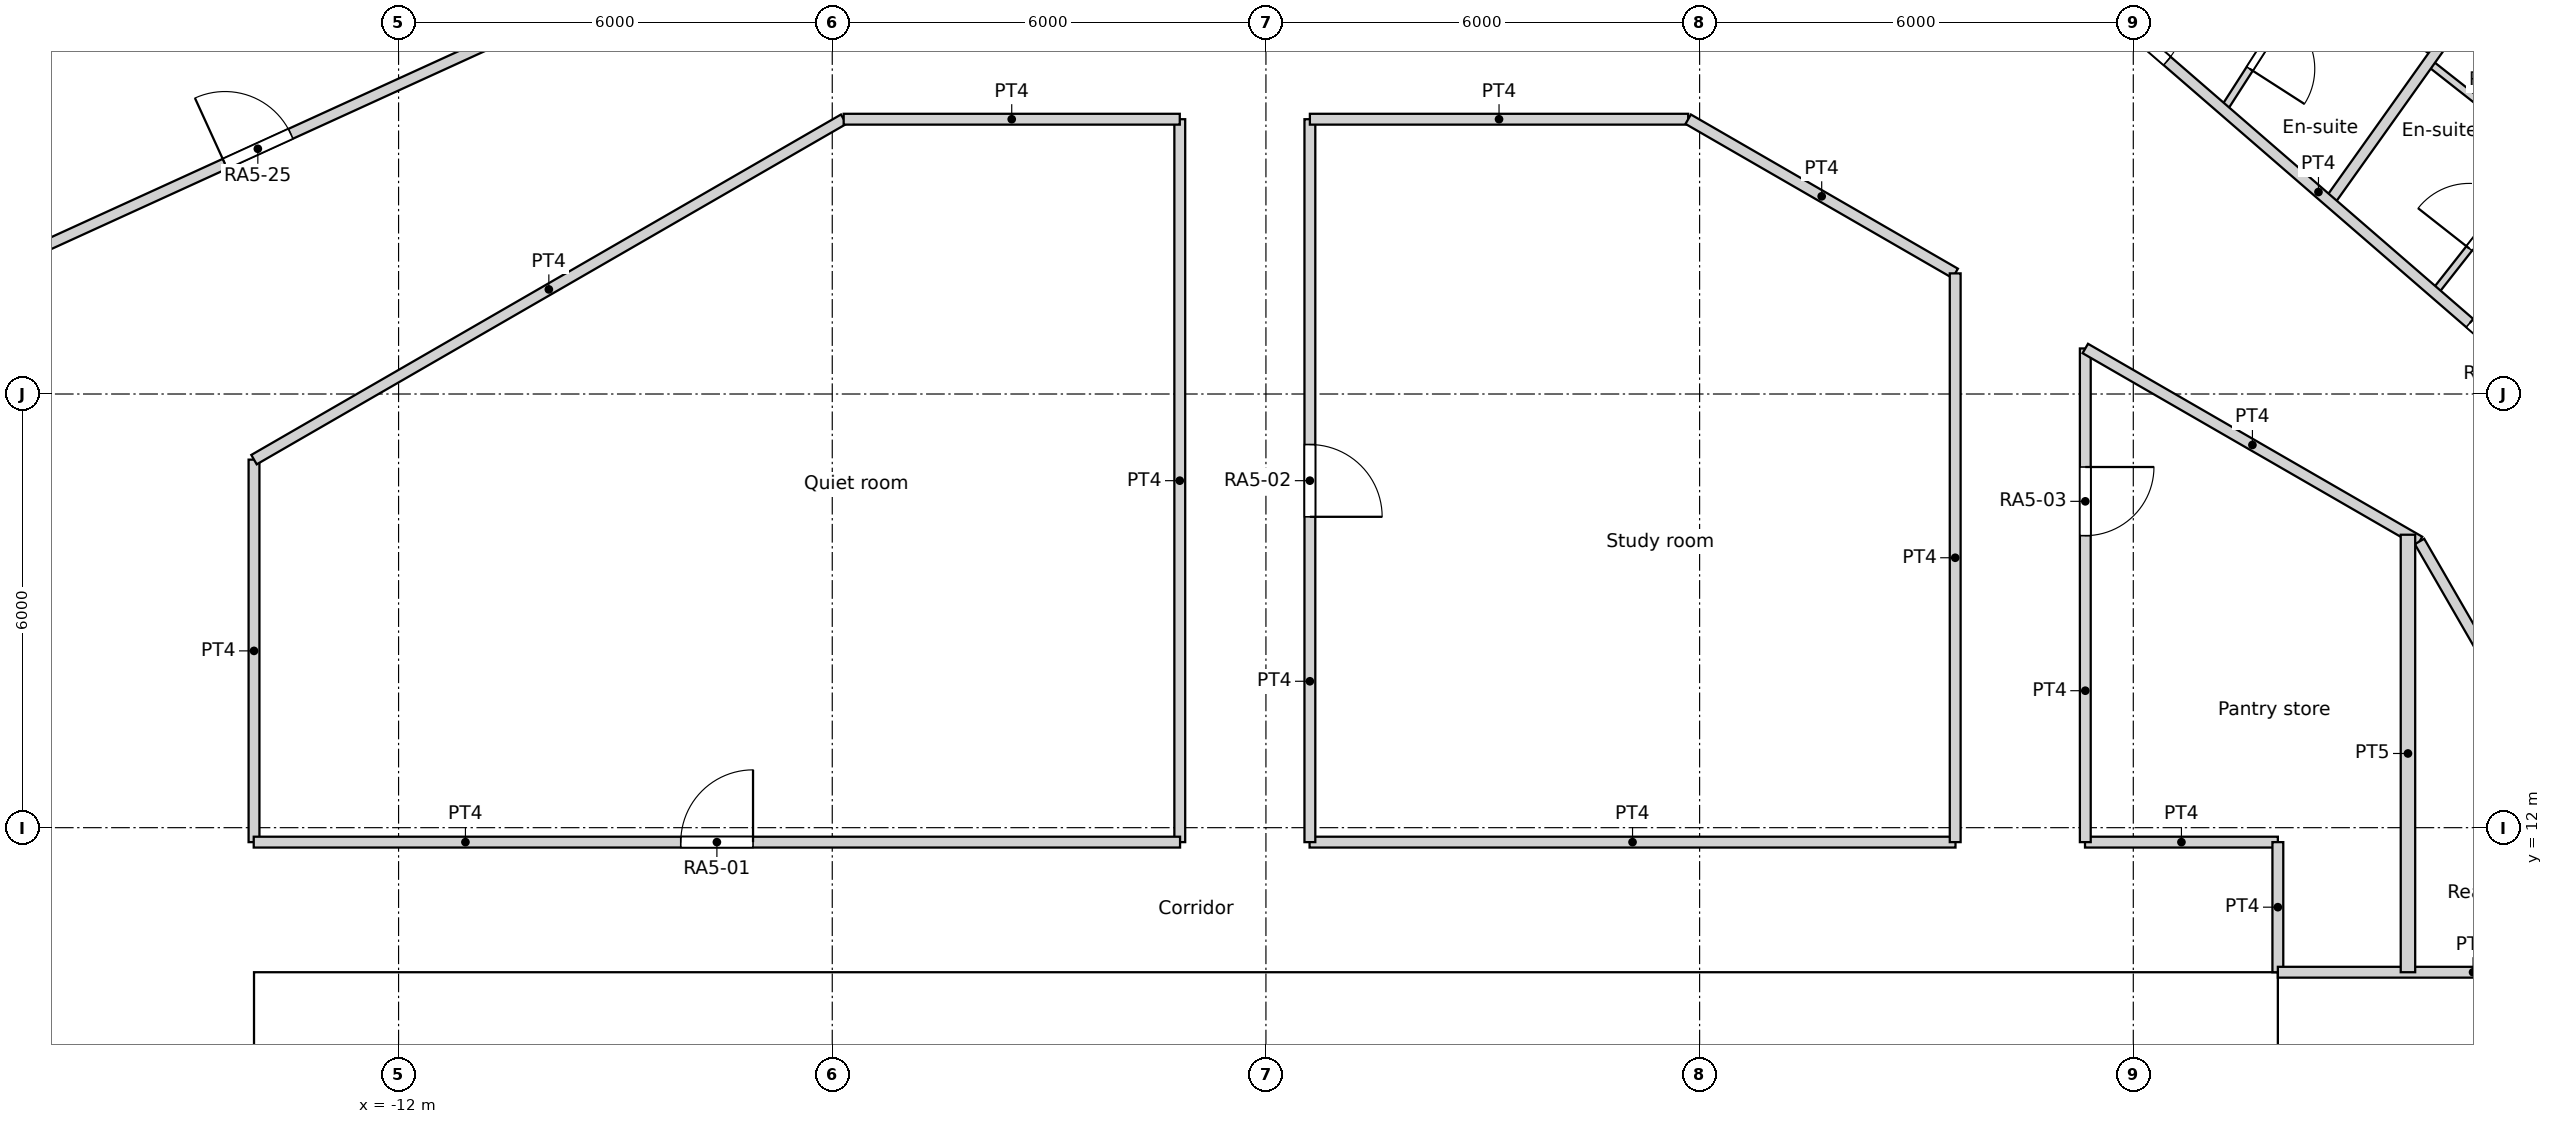
"""IFC4 building model, lengths in metres.
Left out: names, types, materials, properties, quantities, classifications, styles, units other than length and angle.
Written with IfcOpenShell. Run it as: python <this file> out.ifc"""

import sys

from ifc_helpers import new_model, si_unit, direction, frame, frame_2d, origin, origin_2d, place, context, subcontext, project, spatial, rectangle, circle, extrude, element, fill, save


model = new_model("IFC4")
c1 = context("Model", 3, precision=1e-05, world=origin(), true_north=direction((0.0, 1.0)))
c2 = subcontext(c1, "Body", "Model", "MODEL_VIEW")
j1 = project(units=[si_unit("LENGTHUNIT", "METRE"), si_unit("PLANEANGLEUNIT", "RADIAN")], contexts=[c1])
p1 = place(None, origin())
s1 = spatial("IfcSite", under=j1, at=p1, CompositionType="ELEMENT")
p2 = place(p1, origin())
s2 = spatial("IfcBuilding", under=s1, at=p2, CompositionType="ELEMENT")
p3 = place(p2, frame((0.0, 0.0, 71.4)))
s3 = spatial("IfcBuildingStorey", under=s2, at=p3, CompositionType="ELEMENT", Elevation=71.4)
for number, where, z_axis, x_axis in (
    (1, (14.659, 19.69, 0.0), (0.0, 0.0, 1.0), (1.0, 0.0, 0.0)),
    (2, (9.723, 22.54, 0.0), (0.0, 0.0, 1.0), (1.0, 0.0, 0.0)),
    (3, (-12.274, 21.259, 0.0), (0.0, 0.0, 1.0), (1.0, 0.0, 0.0)),
    (4, (-16.846, 17.855, 0.0), (0.0, 0.0, 1.0), (1.0, 0.0, 0.0)),
):
    element("IfcColumn", number, at=place(p3, frame(where, z_axis=z_axis, x_axis=x_axis)), inside=s3, PredefinedType="COLUMN", context=c2, shape_type="SweptSolid", body=[
        extrude(circle(Radius=0.65, at=origin_2d()), origin(), (0.0, 0.0, 1.0), 3.6),
    ])
for number, where, z_axis, x_axis in (
    (5, (15.552, 10.603, 0.0), (0.0, 0.0, 1.0), (1.0, 0.0, 0.0)),
    (6, (11.735, 14.716, 0.0), (0.0, 0.0, 1.0), (1.0, 0.0, 0.0)),
    (7, (6.876, 17.521, 0.0), (0.0, 0.0, 1.0), (1.0, 0.0, 0.0)),
    (8, (1.406, 18.77, 0.0), (0.0, 0.0, 1.0), (1.0, 0.0, 0.0)),
    (9, (-4.188, 18.35, 0.0), (0.0, 0.0, 1.0), (1.0, 0.0, 0.0)),
    (10, (-9.411, 16.301, 0.0), (0.0, 0.0, 1.0), (1.0, 0.0, 0.0)),
    (11, (-13.798, 12.802, 0.0), (0.0, 0.0, 1.0), (1.0, 0.0, 0.0)),
):
    element("IfcColumn", number, at=place(p3, frame(where, z_axis=z_axis, x_axis=x_axis)), inside=s3, PredefinedType="COLUMN", context=c2, shape_type="SweptSolid", body=[
        extrude(circle(Radius=0.7, at=origin_2d()), origin(), (0.0, 0.0, 1.0), 3.6),
    ])
p4 = place(p3, frame((-14.0, 9.4, 0.0), z_axis=(0.0, 0.0, 1.0), x_axis=(1.0, 0.0, 0.0)))
e12 = element("IfcWall", 12, at=p4, inside=s3, PredefinedType="SOLIDWALL", context=c2, shape_type="SweptSolid", body=[
    extrude(rectangle(XDim=28.0, YDim=1.2, at=frame_2d((14.0, 0.0))), origin(), (0.0, 0.0, 1.0), 3.6),
])
p5 = place(p4, frame((9.8, 0.0, 0.0)))
e13 = element("IfcOpeningElement", 13, at=p5, cuts=e12, PredefinedType="OPENING", context=c2, shape_type="SweptSolid", body=[
    extrude(rectangle(XDim=1.8, YDim=2.1, at=frame_2d((0.9, 1.05))), frame((0.0, 0.6, 0.0), z_axis=(0.0, -1.0, 0.0), x_axis=(1.0, 0.0, 0.0)), (0.0, 0.0, 1.0), 1.2),
])
p6 = place(p3, frame((-14.004, 11.8, 0.0), z_axis=(0.0, 0.0, 1.0), x_axis=(1.0, 0.0, 0.0)))
e14 = element("IfcWall", 14, at=p6, inside=s3, PredefinedType="PARTITIONING", context=c2, shape_type="SweptSolid", body=[
    extrude(rectangle(XDim=12.816, YDim=0.15, at=frame_2d((6.408, 0.0))), origin(), (0.0, 0.0, 1.0), 3.15),
])
p7 = place(p6, frame((5.908, 0.0, 0.0)))
e15 = element("IfcOpeningElement", 15, at=p7, cuts=e14, PredefinedType="OPENING", context=c2, shape_type="SweptSolid", body=[
    extrude(rectangle(XDim=1.0, YDim=2.04, at=frame_2d((0.5, 1.02))), frame((0.0, 0.075, 0.0), z_axis=(0.0, -1.0, 0.0), x_axis=(1.0, 0.0, 0.0)), (0.0, 0.0, 1.0), 0.15),
])
p8 = place(p3, frame((0.604, 11.8, 0.0), z_axis=(0.0, 0.0, 1.0), x_axis=(1.0, 0.0, 0.0)))
e16 = element("IfcWall", 16, at=p8, inside=s3, PredefinedType="PARTITIONING", context=c2, shape_type="SweptSolid", body=[
    extrude(rectangle(XDim=8.936, YDim=0.15, at=frame_2d((4.468, 0.0))), origin(), (0.0, 0.0, 1.0), 3.15),
])
p9 = place(p3, frame((11.332, 11.8, 0.0), z_axis=(0.0, 0.0, 1.0), x_axis=(1.0, 0.0, 0.0)))
e17 = element("IfcWall", 17, at=p9, inside=s3, PredefinedType="PARTITIONING", context=c2, shape_type="SweptSolid", body=[
    extrude(rectangle(XDim=2.668, YDim=0.15, at=frame_2d((1.334, 0.0))), origin(), (0.0, 0.0, 1.0), 3.15),
])
p10 = place(p3, frame((14.0, 10.0, 0.0), z_axis=(0.0, 0.0, 1.0), x_axis=(0.0, 1.0, 0.0)))
e18 = element("IfcWall", 18, at=p10, inside=s3, PredefinedType="PARTITIONING", context=c2, shape_type="SweptSolid", body=[
    extrude(rectangle(XDim=1.8, YDim=0.15, at=frame_2d((0.9, 0.0))), origin(), (0.0, 0.0, 1.0), 3.15),
])
p11 = place(p3, frame((14.0, 10.0, 0.0), z_axis=(0.0, 0.0, 1.0), x_axis=(1.0, 0.0, 0.0)))
e19 = element("IfcWall", 19, at=p11, inside=s3, PredefinedType="PARTITIONING", context=c2, shape_type="SweptSolid", body=[
    extrude(rectangle(XDim=5.401, YDim=0.15, at=frame_2d((2.7, 0.0))), origin(), (0.0, 0.0, 1.0), 3.15),
])
p12 = place(p3, frame((15.96, 15.96, 0.0), z_axis=(0.0, 0.0, 1.0), x_axis=(0.499992689227, -0.86602962462, 0.0)))
e20 = element("IfcWall", 20, at=p12, inside=s3, PredefinedType="PARTITIONING", context=c2, shape_type="SweptSolid", body=[
    extrude(rectangle(XDim=6.882, YDim=0.15, at=frame_2d((3.441, 0.0))), origin(), (0.0, 0.0, 1.0), 3.15),
])
p13 = place(p12, frame((2.941, 0.0, 0.0)))
e21 = element("IfcOpeningElement", 21, at=p13, cuts=e20, PredefinedType="OPENING", context=c2, shape_type="SweptSolid", body=[
    extrude(rectangle(XDim=1.0, YDim=2.04, at=frame_2d((0.5, 1.02))), frame((0.0, 0.075, 0.0), z_axis=(0.0, -1.0, 0.0), x_axis=(1.0, 0.0, 0.0)), (0.0, 0.0, 1.0), 0.15),
])
p14 = place(p3, frame((10.932, 23.939, 0.0), z_axis=(0.0, 0.0, 1.0), x_axis=(0.755838982892, -0.654757536757, 0.0)))
e22 = element("IfcWall", 22, at=p14, inside=s3, PredefinedType="PARTITIONING", context=c2, shape_type="SweptSolid", body=[
    extrude(rectangle(XDim=14.83, YDim=0.15, at=frame_2d((7.415, 0.0))), origin(), (0.0, 0.0, 1.0), 3.15),
])
p15 = place(p14, frame((12.796, 0.0, 0.0)))
e23 = element("IfcOpeningElement", 23, at=p15, cuts=e22, PredefinedType="OPENING", context=c2, shape_type="SweptSolid", body=[
    extrude(rectangle(XDim=1.0, YDim=2.1, at=frame_2d((0.5, 1.05))), frame((0.0, 0.075, 0.0), z_axis=(0.0, -1.0, 0.0), x_axis=(1.0, 0.0, 0.0)), (0.0, 0.0, 1.0), 0.15),
])
p16 = place(p14, frame((7.572, 0.0, 0.0)))
e24 = element("IfcOpeningElement", 24, at=p16, cuts=e22, PredefinedType="OPENING", context=c2, shape_type="SweptSolid", body=[
    extrude(rectangle(XDim=1.0, YDim=2.1, at=frame_2d((0.5, 1.05))), frame((0.0, 0.075, 0.0), z_axis=(0.0, -1.0, 0.0), x_axis=(1.0, 0.0, 0.0)), (0.0, 0.0, 1.0), 0.15),
])
p17 = place(p14, frame((1.033, 0.0, 0.0)))
e25 = element("IfcOpeningElement", 25, at=p17, cuts=e22, PredefinedType="OPENING", context=c2, shape_type="SweptSolid", body=[
    extrude(rectangle(XDim=1.0, YDim=2.1, at=frame_2d((0.5, 1.05))), frame((0.0, 0.075, 0.0), z_axis=(0.0, -1.0, 0.0), x_axis=(1.0, 0.0, 0.0)), (0.0, 0.0, 1.0), 0.15),
])
p18 = place(p3, frame((-1.192, 11.8, 0.0), z_axis=(0.0, 0.0, 1.0), x_axis=(0.0, 1.0, 0.0)))
e26 = element("IfcWall", 26, at=p18, inside=s3, PredefinedType="PARTITIONING", context=c2, shape_type="SweptSolid", body=[
    extrude(rectangle(XDim=10.002, YDim=0.15, at=frame_2d((5.001, 0.0))), origin(), (0.0, 0.0, 1.0), 3.15),
])
p19 = place(p3, frame((-5.842, 21.802, 0.0), z_axis=(0.0, 0.0, 1.0), x_axis=(1.0, 0.0, 0.0)))
e27 = element("IfcWall", 27, at=p19, inside=s3, PredefinedType="PARTITIONING", context=c2, shape_type="SweptSolid", body=[
    extrude(rectangle(XDim=4.65, YDim=0.15, at=frame_2d((2.325, 0.0))), origin(), (0.0, 0.0, 1.0), 3.15),
])
p20 = place(p3, frame((-14.0, 17.092, 0.0), z_axis=(0.0, 0.0, 1.0), x_axis=(0.86602719091, 0.499996904595, 0.0)))
e28 = element("IfcWall", 28, at=p20, inside=s3, PredefinedType="PARTITIONING", context=c2, shape_type="SweptSolid", body=[
    extrude(rectangle(XDim=9.42, YDim=0.15, at=frame_2d((4.71, 0.0))), origin(), (0.0, 0.0, 1.0), 3.15),
])
p21 = place(p3, frame((-14.0, 11.8, 0.0), z_axis=(0.0, 0.0, 1.0), x_axis=(0.0, 1.0, 0.0)))
e29 = element("IfcWall", 29, at=p21, inside=s3, PredefinedType="PARTITIONING", context=c2, shape_type="SweptSolid", body=[
    extrude(rectangle(XDim=5.292, YDim=0.15, at=frame_2d((2.646, 0.0))), origin(), (0.0, 0.0, 1.0), 3.15),
])
p22 = place(p3, frame((9.536, 11.8, 0.0), z_axis=(0.0, 0.0, 1.0), x_axis=(0.0, 1.0, 0.0)))
e30 = element("IfcWall", 30, at=p22, inside=s3, PredefinedType="PARTITIONING", context=c2, shape_type="SweptSolid", body=[
    extrude(rectangle(XDim=7.869, YDim=0.15, at=frame_2d((3.935, 0.0))), origin(), (0.0, 0.0, 1.0), 3.15),
])
p23 = place(p3, frame((5.842, 21.802, 0.0), z_axis=(0.0, 0.0, 1.0), x_axis=(0.865983505205, -0.500072563448, 0.0)))
e31 = element("IfcWall", 31, at=p23, inside=s3, PredefinedType="PARTITIONING", context=c2, shape_type="SweptSolid", body=[
    extrude(rectangle(XDim=4.265, YDim=0.15, at=frame_2d((2.133, 0.0))), origin(), (0.0, 0.0, 1.0), 3.15),
])
p24 = place(p3, frame((0.608, 21.802, 0.0), z_axis=(0.0, 0.0, 1.0), x_axis=(1.0, 0.0, 0.0)))
e32 = element("IfcWall", 32, at=p24, inside=s3, PredefinedType="PARTITIONING", context=c2, shape_type="SweptSolid", body=[
    extrude(rectangle(XDim=5.234, YDim=0.15, at=frame_2d((2.617, 0.0))), origin(), (0.0, 0.0, 1.0), 3.15),
])
p25 = place(p3, frame((0.608, 11.8, 0.0), z_axis=(0.0, 0.0, 1.0), x_axis=(0.0, 1.0, 0.0)))
e33 = element("IfcWall", 33, at=p25, inside=s3, PredefinedType="PARTITIONING", context=c2, shape_type="SweptSolid", body=[
    extrude(rectangle(XDim=10.002, YDim=0.15, at=frame_2d((5.001, 0.0))), origin(), (0.0, 0.0, 1.0), 3.15),
])
p26 = place(p25, frame((4.501, 0.0, 0.0)))
e34 = element("IfcOpeningElement", 34, at=p26, cuts=e33, PredefinedType="OPENING", context=c2, shape_type="SweptSolid", body=[
    extrude(rectangle(XDim=1.0, YDim=2.04, at=frame_2d((0.5, 1.02))), frame((0.0, 0.075, 0.0), z_axis=(0.0, -1.0, 0.0), x_axis=(1.0, 0.0, 0.0)), (0.0, 0.0, 1.0), 0.15),
])
p27 = place(p3, frame((11.336, 18.63, 0.0), z_axis=(0.0, 0.0, 1.0), x_axis=(0.866056911224, -0.499945423543, 0.0)))
e35 = element("IfcWall", 35, at=p27, inside=s3, PredefinedType="PARTITIONING", context=c2, shape_type="SweptSolid", body=[
    extrude(rectangle(XDim=5.339, YDim=0.15, at=frame_2d((2.67, 0.0))), origin(), (0.0, 0.0, 1.0), 3.15),
])
p28 = place(p3, frame((11.336, 11.8, 0.0), z_axis=(0.0, 0.0, 1.0), x_axis=(0.0, 1.0, 0.0)))
e36 = element("IfcWall", 36, at=p28, inside=s3, PredefinedType="PARTITIONING", context=c2, shape_type="SweptSolid", body=[
    extrude(rectangle(XDim=6.83, YDim=0.15, at=frame_2d((3.415, 0.0))), origin(), (0.0, 0.0, 1.0), 3.15),
])
p29 = place(p28, frame((4.24, 0.0, 0.0)))
e37 = element("IfcOpeningElement", 37, at=p29, cuts=e36, PredefinedType="OPENING", context=c2, shape_type="SweptSolid", body=[
    extrude(rectangle(XDim=0.95, YDim=2.1, at=frame_2d((0.475, 1.05))), frame((0.0, 0.075, 0.0), z_axis=(0.0, -1.0, 0.0), x_axis=(1.0, 0.0, 0.0)), (0.0, 0.0, 1.0), 0.15),
])
p30 = place(p3, frame((-17.236, 19.891, 0.0), z_axis=(0.0, 0.0, 1.0), x_axis=(0.909645678785, 0.415385049163, 0.0)))
e38 = element("IfcWall", 38, at=p30, inside=s3, PredefinedType="PARTITIONING", context=c2, shape_type="SweptSolid", body=[
    extrude(rectangle(XDim=14.829, YDim=0.15, at=frame_2d((7.415, 0.0))), origin(), (0.0, 0.0, 1.0), 3.15),
])
p31 = place(p30, frame((3.115, 0.0, 0.0)))
e39 = element("IfcOpeningElement", 39, at=p31, cuts=e38, PredefinedType="OPENING", context=c2, shape_type="SweptSolid", body=[
    extrude(rectangle(XDim=1.0, YDim=2.04, at=frame_2d((0.5, 1.02))), frame((0.0, 0.075, 0.0), z_axis=(0.0, -1.0, 0.0), x_axis=(1.0, 0.0, 0.0)), (0.0, 0.0, 1.0), 0.15),
])
p32 = place(p3, frame((15.8, 10.0, 0.0), z_axis=(0.0, 0.0, 1.0), x_axis=(0.0, 1.0, 0.0)))
e40 = element("IfcWall", 40, at=p32, inside=s3, PredefinedType="PARTITIONING", context=c2, shape_type="SweptSolid", body=[
    extrude(rectangle(XDim=6.053, YDim=0.2, at=frame_2d((3.026, 0.0))), origin(), (0.0, 0.0, 1.0), 3.15),
])
p33 = place(p3, frame((16.168, 19.404, 0.0), z_axis=(0.0, 0.0, 1.0), x_axis=(0.618142414415, 0.786066126672, 0.0)))
e41 = element("IfcWall", 41, at=p33, inside=s3, PredefinedType="PARTITIONING", context=c2, shape_type="SweptSolid", body=[
    extrude(rectangle(XDim=2.453, YDim=0.1, at=frame_2d((1.226, 0.0))), origin(), (0.0, 0.0, 1.0), 3.15),
])
p34 = place(p33, frame((0.776, 0.0, 0.0)))
e42 = element("IfcOpeningElement", 42, at=p34, cuts=e41, PredefinedType="OPENING", context=c2, shape_type="SweptSolid", body=[
    extrude(rectangle(XDim=0.9, YDim=2.04, at=frame_2d((0.45, 1.02))), frame((0.0, 0.05, 0.0), z_axis=(0.0, -1.0, 0.0), x_axis=(1.0, 0.0, 0.0)), (0.0, 0.0, 1.0), 0.1),
])
p35 = place(p3, frame((16.086, 22.589, 0.0), z_axis=(0.0, 0.0, 1.0), x_axis=(0.785984904201, -0.618245687707, 0.0)))
e43 = element("IfcWall", 43, at=p35, inside=s3, PredefinedType="PARTITIONING", context=c2, shape_type="SweptSolid", body=[
    extrude(rectangle(XDim=2.033, YDim=0.1, at=frame_2d((1.017, 0.0))), origin(), (0.0, 0.0, 1.0), 3.15),
])
p36 = place(p3, frame((14.715, 20.664, 0.0), z_axis=(0.0, 0.0, 1.0), x_axis=(0.57995989616, 0.814645026282, 0.0)))
e44 = element("IfcWall", 44, at=p36, inside=s3, PredefinedType="PARTITIONING", context=c2, shape_type="SweptSolid", body=[
    extrude(rectangle(XDim=5.857, YDim=0.15, at=frame_2d((2.928, 0.0))), origin(), (0.0, 0.0, 1.0), 3.15),
])
p37 = place(p3, frame((14.46, 23.821, 0.0), z_axis=(0.0, 0.0, 1.0), x_axis=(0.841135728185, -0.540824081168, 0.0)))
e45 = element("IfcWall", 45, at=p37, inside=s3, PredefinedType="PARTITIONING", context=c2, shape_type="SweptSolid", body=[
    extrude(rectangle(XDim=2.041, YDim=0.1, at=frame_2d((1.021, 0.0))), origin(), (0.0, 0.0, 1.0), 3.15),
])
p38 = place(p3, frame((13.248, 21.935, 0.0), z_axis=(0.0, 0.0, 1.0), x_axis=(0.540597960994, 0.841281073464, 0.0)))
e46 = element("IfcWall", 46, at=p38, inside=s3, PredefinedType="PARTITIONING", context=c2, shape_type="SweptSolid", body=[
    extrude(rectangle(XDim=2.242, YDim=0.1, at=frame_2d((1.121, 0.0))), origin(), (0.0, 0.0, 1.0), 3.15),
])
p39 = place(p38, frame((0.671, 0.0, 0.0)))
e47 = element("IfcOpeningElement", 47, at=p39, cuts=e46, PredefinedType="OPENING", context=c2, shape_type="SweptSolid", body=[
    extrude(rectangle(XDim=0.9, YDim=2.04, at=frame_2d((0.45, 1.02))), frame((0.0, 0.05, 0.0), z_axis=(0.0, -1.0, 0.0), x_axis=(1.0, 0.0, 0.0)), (0.0, 0.0, 1.0), 0.1),
])
p40 = place(p5, origin())
e48 = element("IfcDoor", 48, at=p40, inside=s3, OperationType="DOUBLE_DOOR_SINGLE_SWING", PredefinedType="DOOR", context=c2, shape_type="SweptSolid", body=[
    extrude(rectangle(XDim=1.8, YDim=2.1, at=frame_2d((0.9, 1.05))), frame((0.0, 0.025, 0.0), z_axis=(0.0, -1.0, 0.0), x_axis=(1.0, 0.0, 0.0)), (0.0, 0.0, 1.0), 0.05),
])
fill(e13, e48)
p41 = place(p7, origin())
e49 = element("IfcDoor", 49, at=p41, inside=s3, OperationType="SINGLE_SWING_RIGHT", PredefinedType="DOOR", context=c2, shape_type="SweptSolid", body=[
    extrude(rectangle(XDim=1.0, YDim=2.04, at=frame_2d((0.5, 1.02))), frame((0.0, 0.025, 0.0), z_axis=(0.0, -1.0, 0.0), x_axis=(1.0, 0.0, 0.0)), (0.0, 0.0, 1.0), 0.05),
])
fill(e15, e49)
p42 = place(p26, origin())
e50 = element("IfcDoor", 50, at=p42, inside=s3, OperationType="SINGLE_SWING_RIGHT", PredefinedType="DOOR", context=c2, shape_type="SweptSolid", body=[
    extrude(rectangle(XDim=1.0, YDim=2.04, at=frame_2d((0.5, 1.02))), frame((0.0, 0.025, 0.0), z_axis=(0.0, -1.0, 0.0), x_axis=(1.0, 0.0, 0.0)), (0.0, 0.0, 1.0), 0.05),
])
fill(e34, e50)
p43 = place(p29, origin())
e51 = element("IfcDoor", 51, at=p43, inside=s3, OperationType="SINGLE_SWING_LEFT", PredefinedType="DOOR", context=c2, shape_type="SweptSolid", body=[
    extrude(rectangle(XDim=0.95, YDim=2.1, at=frame_2d((0.475, 1.05))), frame((0.0, 0.025, 0.0), z_axis=(0.0, -1.0, 0.0), x_axis=(1.0, 0.0, 0.0)), (0.0, 0.0, 1.0), 0.05),
])
fill(e37, e51)
p44 = place(p34, origin())
e52 = element("IfcDoor", 52, at=p44, inside=s3, OperationType="SINGLE_SWING_LEFT", PredefinedType="DOOR", context=c2, shape_type="SweptSolid", body=[
    extrude(rectangle(XDim=0.9, YDim=2.04, at=frame_2d((0.45, 1.02))), frame((0.0, 0.025, 0.0), z_axis=(0.0, -1.0, 0.0), x_axis=(1.0, 0.0, 0.0)), (0.0, 0.0, 1.0), 0.05),
])
fill(e42, e52)
p45 = place(p16, origin())
e53 = element("IfcDoor", 53, at=p45, inside=s3, OperationType="SINGLE_SWING_LEFT", PredefinedType="DOOR", context=c2, shape_type="SweptSolid", body=[
    extrude(rectangle(XDim=1.0, YDim=2.1, at=frame_2d((0.5, 1.05))), frame((0.0, 0.025, 0.0), z_axis=(0.0, -1.0, 0.0), x_axis=(1.0, 0.0, 0.0)), (0.0, 0.0, 1.0), 0.05),
])
fill(e24, e53)
p46 = place(p39, origin())
e54 = element("IfcDoor", 54, at=p46, inside=s3, OperationType="SINGLE_SWING_RIGHT", PredefinedType="DOOR", context=c2, shape_type="SweptSolid", body=[
    extrude(rectangle(XDim=0.9, YDim=2.04, at=frame_2d((0.45, 1.02))), frame((0.0, 0.025, 0.0), z_axis=(0.0, -1.0, 0.0), x_axis=(1.0, 0.0, 0.0)), (0.0, 0.0, 1.0), 0.05),
])
fill(e47, e54)
p47 = place(p17, origin())
e55 = element("IfcDoor", 55, at=p47, inside=s3, OperationType="SINGLE_SWING_LEFT", PredefinedType="DOOR", context=c2, shape_type="SweptSolid", body=[
    extrude(rectangle(XDim=1.0, YDim=2.1, at=frame_2d((0.5, 1.05))), frame((0.0, 0.025, 0.0), z_axis=(0.0, -1.0, 0.0), x_axis=(1.0, 0.0, 0.0)), (0.0, 0.0, 1.0), 0.05),
])
fill(e25, e55)
p48 = place(p31, origin())
e56 = element("IfcDoor", 56, at=p48, inside=s3, OperationType="SINGLE_SWING_LEFT", PredefinedType="DOOR", context=c2, shape_type="SweptSolid", body=[
    extrude(rectangle(XDim=1.0, YDim=2.04, at=frame_2d((0.5, 1.02))), frame((0.0, 0.025, 0.0), z_axis=(0.0, -1.0, 0.0), x_axis=(1.0, 0.0, 0.0)), (0.0, 0.0, 1.0), 0.05),
])
fill(e39, e56)
save(model, sys.argv[1])
